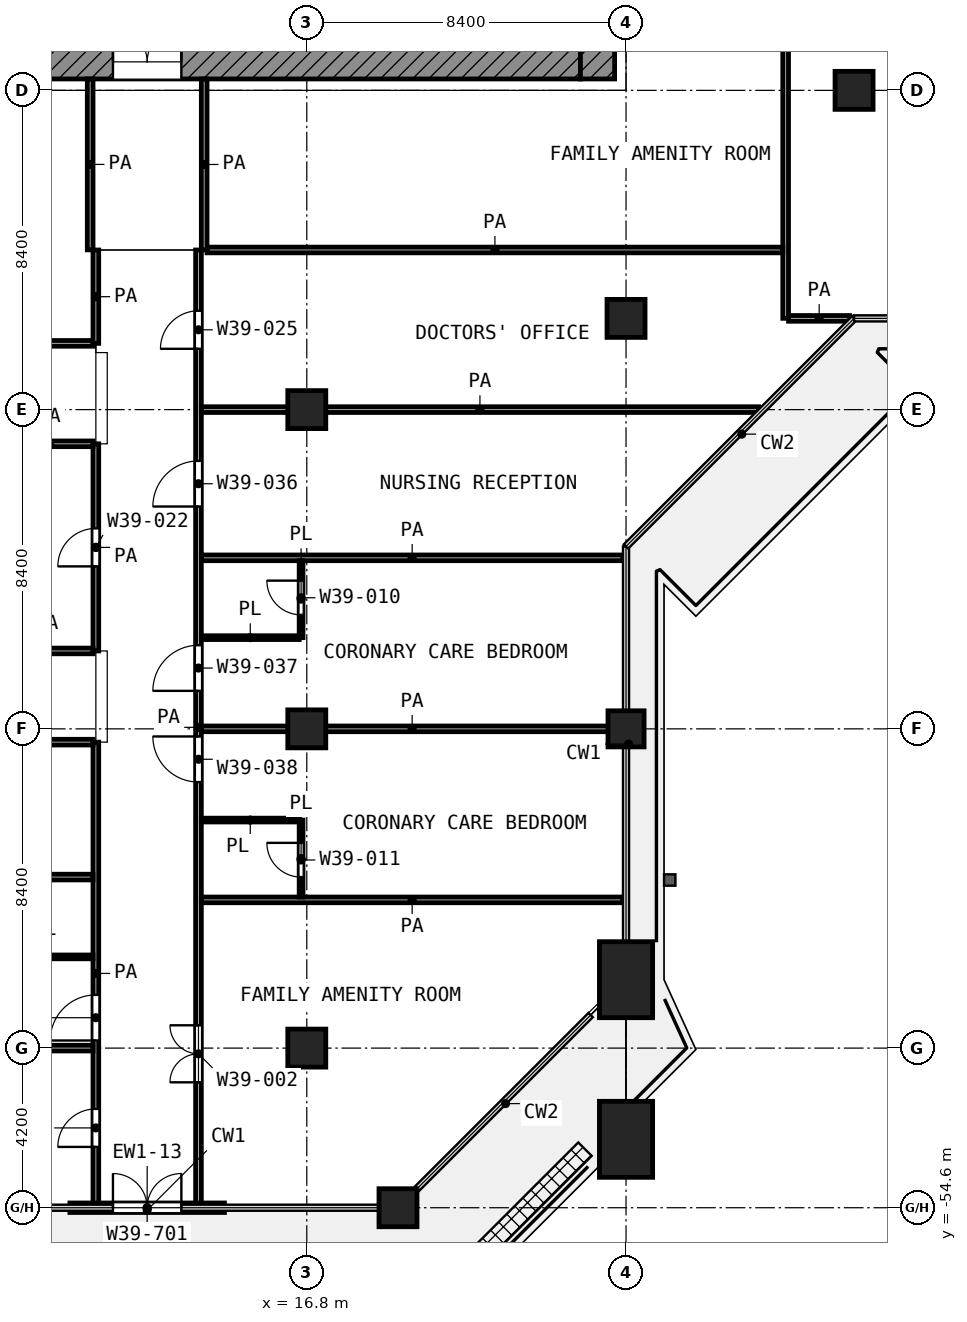
"""IFC4 building model, lengths in metres.
Left out: names, types, materials, properties, quantities, classifications, styles, units other than length and angle.
Written with IfcOpenShell. Run it as: python <this file> out.ifc"""

import sys

from ifc_helpers import new_model, si_unit, direction, frame, frame_2d, origin, origin_2d, place, context, subcontext, project, spatial, rectangle, extrude, element, fill, save


model = new_model("IFC4")
c1 = context("Model", 3, precision=1e-05, world=origin(), true_north=direction((0.0, 1.0)))
c2 = subcontext(c1, "Body", "Model", "MODEL_VIEW")
j1 = project(units=[si_unit("LENGTHUNIT", "METRE"), si_unit("PLANEANGLEUNIT", "RADIAN")], contexts=[c1])
p1 = place(None, origin())
s1 = spatial("IfcSite", under=j1, at=p1, CompositionType="ELEMENT")
p2 = place(p1, origin())
s2 = spatial("IfcBuilding", under=s1, at=p2, CompositionType="ELEMENT")
p3 = place(p2, frame((0.0, 0.0, 171.0)))
s3 = spatial("IfcBuildingStorey", under=s2, at=p3, CompositionType="ELEMENT", Elevation=171.0)
for number, where, z_axis, x_axis in (
    (1, (31.2, -25.2, 0.0), (0.0, 0.0, 1.0), (1.0, 0.0, 0.0)),
    (2, (25.2, -31.2, 0.0), (0.0, 0.0, 1.0), (1.0, 0.0, 0.0)),
    (3, (16.8, -33.6, 0.0), (0.0, 0.0, 1.0), (1.0, 0.0, 0.0)),
    (4, (16.8, -42.0, 0.0), (0.0, 0.0, 1.0), (1.0, 0.0, 0.0)),
):
    element("IfcColumn", number, at=place(p3, frame(where, z_axis=z_axis, x_axis=x_axis)), inside=s3, PredefinedType="COLUMN", context=c2, shape_type="SweptSolid", body=[
        extrude(rectangle(XDim=1.0, YDim=1.0, at=origin_2d()), origin(), (0.0, 0.0, 1.0), 4.2),
    ])
p4 = place(p3, frame((25.2, -42.0, 0.0), z_axis=(0.0, 0.0, 1.0), x_axis=(1.0, 0.0, 0.0)))
e5 = element("IfcColumn", 5, at=p4, inside=s3, PredefinedType="COLUMN", context=c2, shape_type="SweptSolid", body=[
    extrude(rectangle(XDim=0.95, YDim=0.95, at=origin_2d()), origin(), (0.0, 0.0, 1.0), 4.2),
])
p5 = place(p3, frame((25.2, -48.6, 0.0), z_axis=(0.0, 0.0, 1.0), x_axis=(0.0, -1.0, 0.0)))
e6 = element("IfcColumn", 6, at=p5, inside=s3, PredefinedType="COLUMN", context=c2, shape_type="SweptSolid", body=[
    extrude(rectangle(XDim=2.0, YDim=1.4, at=origin_2d()), origin(), (0.0, 0.0, 1.0), 4.2),
])
for number, where, z_axis, x_axis in (
    (7, (16.8, -50.4, 0.0), (0.0, 0.0, 1.0), (1.0, 0.0, 0.0)),
    (8, (19.2, -54.6, 0.0), (0.0, 0.0, 1.0), (1.0, 0.0, 0.0)),
):
    element("IfcColumn", number, at=place(p3, frame(where, z_axis=z_axis, x_axis=x_axis)), inside=s3, PredefinedType="COLUMN", context=c2, shape_type="SweptSolid", body=[
        extrude(rectangle(XDim=1.0, YDim=1.0, at=origin_2d()), origin(), (0.0, 0.0, 1.0), 4.2),
    ])
p6 = place(p3, frame((25.2, -52.8, 0.0), z_axis=(0.0, 0.0, 1.0), x_axis=(0.0, -1.0, 0.0)))
e9 = element("IfcColumn", 9, at=p6, inside=s3, PredefinedType="COLUMN", context=c2, shape_type="SweptSolid", body=[
    extrude(rectangle(XDim=2.0, YDim=1.4, at=origin_2d()), origin(), (0.0, 0.0, 1.0), 4.2),
])
p7 = place(p3, frame((10.567, -54.6, 0.0), z_axis=(0.0, 0.0, 1.0), x_axis=(1.0, 0.0, 0.0)))
e10 = element("IfcWall", 10, at=p7, inside=s3, PredefinedType="SOLIDWALL", context=c2, shape_type="SweptSolid", body=[
    extrude(rectangle(XDim=4.067, YDim=0.25, at=frame_2d((2.033, 0.0))), origin(), (0.0, 0.0, 1.0), 3.48),
])
p8 = place(p7, frame((1.133, 0.0, 0.0)))
e11 = element("IfcOpeningElement", 11, at=p8, cuts=e10, PredefinedType="OPENING", context=c2, shape_type="SweptSolid", body=[
    extrude(rectangle(XDim=1.8, YDim=2.1, at=frame_2d((0.9, 1.05))), frame((0.0, 0.135, 0.0), z_axis=(0.0, -1.0, 0.0), x_axis=(1.0, 0.0, 0.0)), (0.0, 0.0, 1.0), 0.27),
])
p9 = place(p3, frame((5.4, -24.45, 0.0), z_axis=(0.0, 0.0, 1.0), x_axis=(1.0, 0.0, 0.0)))
e12 = element("IfcWall", 12, at=p9, inside=s3, PredefinedType="SHEAR", context=c2, shape_type="SweptSolid", body=[
    extrude(rectangle(XDim=18.6, YDim=0.9, at=frame_2d((9.3, 0.0))), origin(), (0.0, 0.0, 1.0), 3.6),
])
p10 = place(p9, frame((6.3, 0.0, 0.0)))
e13 = element("IfcOpeningElement", 13, at=p10, cuts=e12, PredefinedType="OPENING", context=c2, shape_type="SweptSolid", body=[
    extrude(rectangle(XDim=1.8, YDim=2.1, at=frame_2d((0.9, 1.05))), frame((0.0, 0.46, 0.0), z_axis=(0.0, -1.0, 0.0), x_axis=(1.0, 0.0, 0.0)), (0.0, 0.0, 1.0), 0.92),
])
p11 = place(p3, frame((24.45, -24.9, 0.0), z_axis=(0.0, 0.0, 1.0), x_axis=(0.0, 1.0, 0.0)))
e14 = element("IfcWall", 14, at=p11, inside=s3, PredefinedType="SHEAR", context=c2, shape_type="SweptSolid", body=[
    extrude(rectangle(XDim=0.9, YDim=0.9, at=frame_2d((0.45, 0.0))), origin(), (0.0, 0.0, 1.0), 3.6),
])
p12 = place(p3, frame((8.6, -48.0, 0.0), z_axis=(0.0, 0.0, 1.0), x_axis=(1.0, 0.0, 0.0)))
e15 = element("IfcWall", 15, at=p12, inside=s3, PredefinedType="PARTITIONING", context=c2, shape_type="SweptSolid", body=[
    extrude(rectangle(XDim=2.575, YDim=0.1, at=frame_2d((1.288, 0.0))), origin(), (0.0, 0.0, 1.0), 3.6),
])
for number, where, z_axis, x_axis in (
    (16, (14.025, -44.4, 0.0), (0.0, 0.0, 1.0), (1.0, 0.0, 0.0)),
    (17, (14.025, -39.6, 0.0), (0.0, 0.0, 1.0), (1.0, 0.0, 0.0)),
):
    element("IfcWall", number, at=place(p3, frame(where, z_axis=z_axis, x_axis=x_axis)), inside=s3, PredefinedType="PARTITIONING", context=c2, shape_type="SweptSolid", body=[
        extrude(rectangle(XDim=2.575, YDim=0.1, at=frame_2d((1.288, 0.0))), origin(), (0.0, 0.0, 1.0), 3.6),
    ])
p13 = place(p3, frame((16.65, -46.425, 0.0), z_axis=(0.0, 0.0, 1.0), x_axis=(0.0, 1.0, 0.0)))
e18 = element("IfcWall", 18, at=p13, inside=s3, PredefinedType="PARTITIONING", context=c2, shape_type="SweptSolid", body=[
    extrude(rectangle(XDim=2.025, YDim=0.1, at=frame_2d((1.013, 0.0))), origin(), (0.0, 0.0, 1.0), 3.6),
])
p14 = place(p13, frame((0.525, 0.0, 0.0)))
e19 = element("IfcOpeningElement", 19, at=p14, cuts=e18, PredefinedType="OPENING", context=c2, shape_type="SweptSolid", body=[
    extrude(rectangle(XDim=0.9, YDim=2.1, at=frame_2d((0.45, 1.05))), frame((0.0, 0.06, 0.0), z_axis=(0.0, -1.0, 0.0), x_axis=(1.0, 0.0, 0.0)), (0.0, 0.0, 1.0), 0.12),
])
p15 = place(p3, frame((16.65, -39.6, 0.0), z_axis=(0.0, 0.0, 1.0), x_axis=(0.0, 1.0, 0.0)))
e20 = element("IfcWall", 20, at=p15, inside=s3, PredefinedType="PARTITIONING", context=c2, shape_type="SweptSolid", body=[
    extrude(rectangle(XDim=2.025, YDim=0.1, at=frame_2d((1.013, 0.0))), origin(), (0.0, 0.0, 1.0), 3.6),
])
p16 = place(p15, frame((0.6, 0.0, 0.0)))
e21 = element("IfcOpeningElement", 21, at=p16, cuts=e20, PredefinedType="OPENING", context=c2, shape_type="SweptSolid", body=[
    extrude(rectangle(XDim=0.9, YDim=2.1, at=frame_2d((0.45, 1.05))), frame((0.0, 0.06, 0.0), z_axis=(0.0, -1.0, 0.0), x_axis=(1.0, 0.0, 0.0)), (0.0, 0.0, 1.0), 0.12),
])
p17 = place(p3, frame((1.913, -50.4, 0.0), z_axis=(0.0, 0.0, 1.0), x_axis=(1.0, 0.0, 0.0)))
e22 = element("IfcWall", 22, at=p17, inside=s3, PredefinedType="PARTITIONING", context=c2, shape_type="SweptSolid", body=[
    extrude(rectangle(XDim=9.262, YDim=0.15, at=frame_2d((4.631, 0.0))), origin(), (0.0, 0.0, 1.0), 3.6),
])
p18 = place(p3, frame((14.025, -46.5, 0.0), z_axis=(0.0, 0.0, 1.0), x_axis=(1.0, 0.0, 0.0)))
e23 = element("IfcWall", 23, at=p18, inside=s3, PredefinedType="PARTITIONING", context=c2, shape_type="SweptSolid", body=[
    extrude(rectangle(XDim=11.095, YDim=0.15, at=frame_2d((5.548, 0.0))), origin(), (0.0, 0.0, 1.0), 3.6),
])
p19 = place(p3, frame((0.08, -45.9, 0.0), z_axis=(0.0, 0.0, 1.0), x_axis=(1.0, 0.0, 0.0)))
e24 = element("IfcWall", 24, at=p19, inside=s3, PredefinedType="PARTITIONING", context=c2, shape_type="SweptSolid", body=[
    extrude(rectangle(XDim=11.095, YDim=0.15, at=frame_2d((5.547, 0.0))), origin(), (0.0, 0.0, 1.0), 3.6),
])
p20 = place(p3, frame((2.327, -42.35, 0.0), z_axis=(0.0, 0.0, 1.0), x_axis=(1.0, 0.0, 0.0)))
e25 = element("IfcWall", 25, at=p20, inside=s3, PredefinedType="PARTITIONING", context=c2, shape_type="SweptSolid", body=[
    extrude(rectangle(XDim=8.848, YDim=0.15, at=frame_2d((4.424, 0.0))), origin(), (0.0, 0.0, 1.0), 3.6),
])
p21 = place(p20, frame((3.924, 0.0, 0.0)))
e26 = element("IfcOpeningElement", 26, at=p21, cuts=e25, PredefinedType="OPENING", context=c2, shape_type="SweptSolid", body=[
    extrude(rectangle(XDim=1.0, YDim=2.1, at=frame_2d((0.5, 1.05))), frame((0.0, 0.085, 0.0), z_axis=(0.0, -1.0, 0.0), x_axis=(1.0, 0.0, 0.0)), (0.0, 0.0, 1.0), 0.17),
])
p22 = place(p3, frame((14.025, -42.0, 0.0), z_axis=(0.0, 0.0, 1.0), x_axis=(1.0, 0.0, 0.0)))
e27 = element("IfcWall", 27, at=p22, inside=s3, PredefinedType="PARTITIONING", context=c2, shape_type="SweptSolid", body=[
    extrude(rectangle(XDim=11.095, YDim=0.15, at=frame_2d((5.548, 0.0))), origin(), (0.0, 0.0, 1.0), 3.6),
])
p23 = place(p3, frame((8.73, -39.95, 0.0), z_axis=(0.0, 0.0, 1.0), x_axis=(1.0, 0.0, 0.0)))
e28 = element("IfcWall", 28, at=p23, inside=s3, PredefinedType="PARTITIONING", context=c2, shape_type="SweptSolid", body=[
    extrude(rectangle(XDim=2.445, YDim=0.15, at=frame_2d((1.223, 0.0))), origin(), (0.0, 0.0, 1.0), 3.6),
])
p24 = place(p3, frame((14.025, -37.5, 0.0), z_axis=(0.0, 0.0, 1.0), x_axis=(1.0, 0.0, 0.0)))
e29 = element("IfcWall", 29, at=p24, inside=s3, PredefinedType="PARTITIONING", context=c2, shape_type="SweptSolid", body=[
    extrude(rectangle(XDim=11.095, YDim=0.15, at=frame_2d((5.548, 0.0))), origin(), (0.0, 0.0, 1.0), 3.6),
])
p25 = place(p3, frame((8.9, -34.5, 0.0), z_axis=(0.0, 0.0, 1.0), x_axis=(1.0, 0.0, 0.0)))
e30 = element("IfcWall", 30, at=p25, inside=s3, PredefinedType="PARTITIONING", context=c2, shape_type="SweptSolid", body=[
    extrude(rectangle(XDim=2.275, YDim=0.15, at=frame_2d((1.138, 0.0))), origin(), (0.0, 0.0, 1.0), 3.6),
])
p26 = place(p3, frame((14.025, -33.6, 0.0), z_axis=(0.0, 0.0, 1.0), x_axis=(1.0, 0.0, 0.0)))
e31 = element("IfcWall", 31, at=p26, inside=s3, PredefinedType="PARTITIONING", context=c2, shape_type="SweptSolid", body=[
    extrude(rectangle(XDim=14.662, YDim=0.15, at=frame_2d((7.331, 0.0))), origin(), (0.0, 0.0, 1.0), 3.6),
])
p27 = place(p3, frame((1.077, -31.857, 0.0), z_axis=(0.0, 0.0, 1.0), x_axis=(1.0, 0.0, 0.0)))
e32 = element("IfcWall", 32, at=p27, inside=s3, PredefinedType="PARTITIONING", context=c2, shape_type="SweptSolid", body=[
    extrude(rectangle(XDim=10.098, YDim=0.15, at=frame_2d((5.049, 0.0))), origin(), (0.0, 0.0, 1.0), 3.6),
])
p28 = place(p27, frame((4.449, 0.0, 0.0)))
e33 = element("IfcOpeningElement", 33, at=p28, cuts=e32, PredefinedType="OPENING", context=c2, shape_type="SweptSolid", body=[
    extrude(rectangle(XDim=1.2, YDim=2.1, at=frame_2d((0.6, 1.05))), frame((0.0, 0.085, 0.0), z_axis=(0.0, -1.0, 0.0), x_axis=(1.0, 0.0, 0.0)), (0.0, 0.0, 1.0), 0.17),
])
p29 = place(p3, frame((29.477, -31.2, 0.0), z_axis=(0.0, 0.0, 1.0), x_axis=(1.0, 0.0, 0.0)))
e34 = element("IfcWall", 34, at=p29, inside=s3, PredefinedType="PARTITIONING", context=c2, shape_type="SweptSolid", body=[
    extrude(rectangle(XDim=1.61, YDim=0.15, at=frame_2d((0.805, 0.0))), origin(), (0.0, 0.0, 1.0), 3.6),
])
p30 = place(p3, frame((14.175, -29.4, 0.0), z_axis=(0.0, 0.0, 1.0), x_axis=(1.0, 0.0, 0.0)))
e35 = element("IfcWall", 35, at=p30, inside=s3, PredefinedType="PARTITIONING", context=c2, shape_type="SweptSolid", body=[
    extrude(rectangle(XDim=15.15, YDim=0.15, at=frame_2d((7.575, 0.0))), origin(), (0.0, 0.0, 1.0), 3.6),
])
p31 = place(p3, frame((11.1, -29.397, 0.0), z_axis=(0.0, 0.0, 1.0), x_axis=(0.0, 1.0, 0.0)))
e36 = element("IfcWall", 36, at=p31, inside=s3, PredefinedType="PARTITIONING", context=c2, shape_type="SweptSolid", body=[
    extrude(rectangle(XDim=4.497, YDim=0.15, at=frame_2d((2.249, 0.0))), origin(), (0.0, 0.0, 1.0), 3.6),
])
p32 = place(p3, frame((11.25, -54.52, 0.0), z_axis=(0.0, 0.0, 1.0), x_axis=(0.0, 1.0, 0.0)))
e37 = element("IfcWall", 37, at=p32, inside=s3, PredefinedType="PARTITIONING", context=c2, shape_type="SweptSolid", body=[
    extrude(rectangle(XDim=12.17, YDim=0.15, at=frame_2d((6.085, 0.0))), origin(), (0.0, 0.0, 1.0), 3.6),
])
p33 = place(p32, frame((4.32, 0.0, 0.0)))
e38 = element("IfcOpeningElement", 38, at=p33, cuts=e37, PredefinedType="OPENING", context=c2, shape_type="SweptSolid", body=[
    extrude(rectangle(XDim=1.2, YDim=2.1, at=frame_2d((0.6, 1.05))), frame((0.0, 0.085, 0.0), z_axis=(0.0, -1.0, 0.0), x_axis=(1.0, 0.0, 0.0)), (0.0, 0.0, 1.0), 0.17),
])
p34 = place(p32, frame((1.52, 0.0, 0.0)))
e39 = element("IfcOpeningElement", 39, at=p34, cuts=e37, PredefinedType="OPENING", context=c2, shape_type="SweptSolid", body=[
    extrude(rectangle(XDim=1.0, YDim=2.1, at=frame_2d((0.5, 1.05))), frame((0.0, 0.085, 0.0), z_axis=(0.0, -1.0, 0.0), x_axis=(1.0, 0.0, 0.0)), (0.0, 0.0, 1.0), 0.17),
])
p35 = place(p3, frame((11.25, -39.95, 0.0), z_axis=(0.0, 0.0, 1.0), x_axis=(0.0, 1.0, 0.0)))
e40 = element("IfcWall", 40, at=p35, inside=s3, PredefinedType="PARTITIONING", context=c2, shape_type="SweptSolid", body=[
    extrude(rectangle(XDim=5.45, YDim=0.15, at=frame_2d((2.725, 0.0))), origin(), (0.0, 0.0, 1.0), 3.6),
])
p36 = place(p35, frame((2.225, 0.0, 0.0)))
e41 = element("IfcOpeningElement", 41, at=p36, cuts=e40, PredefinedType="OPENING", context=c2, shape_type="SweptSolid", body=[
    extrude(rectangle(XDim=1.0, YDim=2.1, at=frame_2d((0.5, 1.05))), frame((0.0, 0.085, 0.0), z_axis=(0.0, -1.0, 0.0), x_axis=(1.0, 0.0, 0.0)), (0.0, 0.0, 1.0), 0.17),
])
p37 = place(p3, frame((11.25, -31.857, 0.0), z_axis=(0.0, 0.0, 1.0), x_axis=(0.0, 1.0, 0.0)))
e42 = element("IfcWall", 42, at=p37, inside=s3, PredefinedType="PARTITIONING", context=c2, shape_type="SweptSolid", body=[
    extrude(rectangle(XDim=2.457, YDim=0.15, at=frame_2d((1.229, 0.0))), origin(), (0.0, 0.0, 1.0), 3.6),
])
p38 = place(p3, frame((13.95, -54.52, 0.0), z_axis=(0.0, 0.0, 1.0), x_axis=(0.0, 1.0, 0.0)))
e43 = element("IfcWall", 43, at=p38, inside=s3, PredefinedType="PARTITIONING", context=c2, shape_type="SweptSolid", body=[
    extrude(rectangle(XDim=25.12, YDim=0.15, at=frame_2d((12.56, 0.0))), origin(), (0.0, 0.0, 1.0), 3.6),
])
p39 = place(p38, frame((22.52, 0.0, 0.0)))
e44 = element("IfcOpeningElement", 44, at=p39, cuts=e43, PredefinedType="OPENING", context=c2, shape_type="SweptSolid", body=[
    extrude(rectangle(XDim=1.0, YDim=2.1, at=frame_2d((0.5, 1.05))), frame((0.0, 0.085, 0.0), z_axis=(0.0, -1.0, 0.0), x_axis=(1.0, 0.0, 0.0)), (0.0, 0.0, 1.0), 0.17),
])
p40 = place(p38, frame((18.37, 0.0, 0.0)))
e45 = element("IfcOpeningElement", 45, at=p40, cuts=e43, PredefinedType="OPENING", context=c2, shape_type="SweptSolid", body=[
    extrude(rectangle(XDim=1.2, YDim=2.1, at=frame_2d((0.6, 1.05))), frame((0.0, 0.085, 0.0), z_axis=(0.0, -1.0, 0.0), x_axis=(1.0, 0.0, 0.0)), (0.0, 0.0, 1.0), 0.17),
])
p41 = place(p38, frame((13.52, 0.0, 0.0)))
e46 = element("IfcOpeningElement", 46, at=p41, cuts=e43, PredefinedType="OPENING", context=c2, shape_type="SweptSolid", body=[
    extrude(rectangle(XDim=1.2, YDim=2.1, at=frame_2d((0.6, 1.05))), frame((0.0, 0.085, 0.0), z_axis=(0.0, -1.0, 0.0), x_axis=(1.0, 0.0, 0.0)), (0.0, 0.0, 1.0), 0.17),
])
p42 = place(p38, frame((11.12, 0.0, 0.0)))
e47 = element("IfcOpeningElement", 47, at=p42, cuts=e43, PredefinedType="OPENING", context=c2, shape_type="SweptSolid", body=[
    extrude(rectangle(XDim=1.2, YDim=2.1, at=frame_2d((0.6, 1.05))), frame((0.0, 0.085, 0.0), z_axis=(0.0, -1.0, 0.0), x_axis=(1.0, 0.0, 0.0)), (0.0, 0.0, 1.0), 0.17),
])
p43 = place(p38, frame((3.22, 0.0, 0.0)))
e48 = element("IfcOpeningElement", 48, at=p43, cuts=e43, PredefinedType="OPENING", context=c2, shape_type="SweptSolid", body=[
    extrude(rectangle(XDim=1.5, YDim=2.1, at=frame_2d((0.75, 1.05))), frame((0.0, 0.085, 0.0), z_axis=(0.0, -1.0, 0.0), x_axis=(1.0, 0.0, 0.0)), (0.0, 0.0, 1.0), 0.17),
])
p44 = place(p3, frame((14.1, -29.4, 0.0), z_axis=(0.0, 0.0, 1.0), x_axis=(0.0, 1.0, 0.0)))
e49 = element("IfcWall", 49, at=p44, inside=s3, PredefinedType="PARTITIONING", context=c2, shape_type="SweptSolid", body=[
    extrude(rectangle(XDim=4.5, YDim=0.15, at=frame_2d((2.25, 0.0))), origin(), (0.0, 0.0, 1.0), 3.6),
])
p45 = place(p3, frame((29.4, -31.198, 0.0), z_axis=(0.0, 0.0, 1.0), x_axis=(0.0, 1.0, 0.0)))
e50 = element("IfcWall", 50, at=p45, inside=s3, PredefinedType="PARTITIONING", context=c2, shape_type="SweptSolid", body=[
    extrude(rectangle(XDim=17.098, YDim=0.15, at=frame_2d((8.549, 0.0))), origin(), (0.0, 0.0, 1.0), 3.6),
])
p46 = place(p8, origin())
e51 = element("IfcDoor", 51, at=p46, inside=s3, OperationType="DOUBLE_DOOR_SINGLE_SWING", PredefinedType="DOOR", context=c2, shape_type="SweptSolid", body=[
    extrude(rectangle(XDim=1.8, YDim=2.1, at=frame_2d((0.9, 1.05))), frame((0.0, 0.025, 0.0), z_axis=(0.0, -1.0, 0.0), x_axis=(1.0, 0.0, 0.0)), (0.0, 0.0, 1.0), 0.05),
])
fill(e11, e51)
p47 = place(p10, origin())
e52 = element("IfcDoor", 52, at=p47, inside=s3, OperationType="DOUBLE_DOOR_SINGLE_SWING", PredefinedType="DOOR", context=c2, shape_type="SweptSolid", body=[
    extrude(rectangle(XDim=1.8, YDim=2.1, at=frame_2d((0.9, 1.05))), frame((0.0, 0.025, 0.0), z_axis=(0.0, -1.0, 0.0), x_axis=(1.0, 0.0, 0.0)), (0.0, 0.0, 1.0), 0.05),
])
fill(e13, e52)
p48 = place(p36, origin())
e53 = element("IfcDoor", 53, at=p48, inside=s3, OperationType="SINGLE_SWING_LEFT", PredefinedType="DOOR", context=c2, shape_type="SweptSolid", body=[
    extrude(rectangle(XDim=1.0, YDim=2.1, at=frame_2d((0.5, 1.05))), frame((0.0, 0.025, 0.0), z_axis=(0.0, -1.0, 0.0), x_axis=(1.0, 0.0, 0.0)), (0.0, 0.0, 1.0), 0.05),
])
fill(e41, e53)
p49 = place(p33, origin())
e54 = element("IfcDoor", 54, at=p49, inside=s3, OperationType="SINGLE_SWING_LEFT", PredefinedType="DOOR", context=c2, shape_type="SweptSolid", body=[
    extrude(rectangle(XDim=1.2, YDim=2.1, at=frame_2d((0.6, 1.05))), frame((0.0, 0.025, 0.0), z_axis=(0.0, -1.0, 0.0), x_axis=(1.0, 0.0, 0.0)), (0.0, 0.0, 1.0), 0.05),
])
fill(e38, e54)
p50 = place(p34, origin())
e55 = element("IfcDoor", 55, at=p50, inside=s3, OperationType="SINGLE_SWING_LEFT", PredefinedType="DOOR", context=c2, shape_type="SweptSolid", body=[
    extrude(rectangle(XDim=1.0, YDim=2.1, at=frame_2d((0.5, 1.05))), frame((0.0, 0.025, 0.0), z_axis=(0.0, -1.0, 0.0), x_axis=(1.0, 0.0, 0.0)), (0.0, 0.0, 1.0), 0.05),
])
fill(e39, e55)
p51 = place(p39, origin())
e56 = element("IfcDoor", 56, at=p51, inside=s3, OperationType="SINGLE_SWING_LEFT", PredefinedType="DOOR", context=c2, shape_type="SweptSolid", body=[
    extrude(rectangle(XDim=1.0, YDim=2.1, at=frame_2d((0.5, 1.05))), frame((0.0, 0.025, 0.0), z_axis=(0.0, -1.0, 0.0), x_axis=(1.0, 0.0, 0.0)), (0.0, 0.0, 1.0), 0.05),
])
fill(e44, e56)
p52 = place(p40, origin())
e57 = element("IfcDoor", 57, at=p52, inside=s3, OperationType="SINGLE_SWING_LEFT", PredefinedType="DOOR", context=c2, shape_type="SweptSolid", body=[
    extrude(rectangle(XDim=1.2, YDim=2.1, at=frame_2d((0.6, 1.05))), frame((0.0, 0.025, 0.0), z_axis=(0.0, -1.0, 0.0), x_axis=(1.0, 0.0, 0.0)), (0.0, 0.0, 1.0), 0.05),
])
fill(e45, e57)
p53 = place(p41, origin())
e58 = element("IfcDoor", 58, at=p53, inside=s3, OperationType="SINGLE_SWING_LEFT", PredefinedType="DOOR", context=c2, shape_type="SweptSolid", body=[
    extrude(rectangle(XDim=1.2, YDim=2.1, at=frame_2d((0.6, 1.05))), frame((0.0, 0.025, 0.0), z_axis=(0.0, -1.0, 0.0), x_axis=(1.0, 0.0, 0.0)), (0.0, 0.0, 1.0), 0.05),
])
fill(e46, e58)
p54 = place(p16, origin())
e59 = element("IfcDoor", 59, at=p54, inside=s3, OperationType="SINGLE_SWING_RIGHT", PredefinedType="DOOR", context=c2, shape_type="SweptSolid", body=[
    extrude(rectangle(XDim=0.9, YDim=2.1, at=frame_2d((0.45, 1.05))), frame((0.0, 0.025, 0.0), z_axis=(0.0, -1.0, 0.0), x_axis=(1.0, 0.0, 0.0)), (0.0, 0.0, 1.0), 0.05),
])
fill(e21, e59)
p55 = place(p42, origin())
e60 = element("IfcDoor", 60, at=p55, inside=s3, OperationType="SINGLE_SWING_RIGHT", PredefinedType="DOOR", context=c2, shape_type="SweptSolid", body=[
    extrude(rectangle(XDim=1.2, YDim=2.1, at=frame_2d((0.6, 1.05))), frame((0.0, 0.025, 0.0), z_axis=(0.0, -1.0, 0.0), x_axis=(1.0, 0.0, 0.0)), (0.0, 0.0, 1.0), 0.05),
])
fill(e47, e60)
p56 = place(p14, origin())
e61 = element("IfcDoor", 61, at=p56, inside=s3, OperationType="SINGLE_SWING_RIGHT", PredefinedType="DOOR", context=c2, shape_type="SweptSolid", body=[
    extrude(rectangle(XDim=0.9, YDim=2.1, at=frame_2d((0.45, 1.05))), frame((0.0, 0.025, 0.0), z_axis=(0.0, -1.0, 0.0), x_axis=(1.0, 0.0, 0.0)), (0.0, 0.0, 1.0), 0.05),
])
fill(e19, e61)
p57 = place(p43, origin())
e62 = element("IfcDoor", 62, at=p57, inside=s3, OperationType="DOUBLE_DOOR_SINGLE_SWING", PredefinedType="DOOR", context=c2, shape_type="SweptSolid", body=[
    extrude(rectangle(XDim=1.5, YDim=2.1, at=frame_2d((0.75, 1.05))), frame((0.0, 0.025, 0.0), z_axis=(0.0, -1.0, 0.0), x_axis=(1.0, 0.0, 0.0)), (0.0, 0.0, 1.0), 0.05),
])
fill(e48, e62)
save(model, sys.argv[1])
